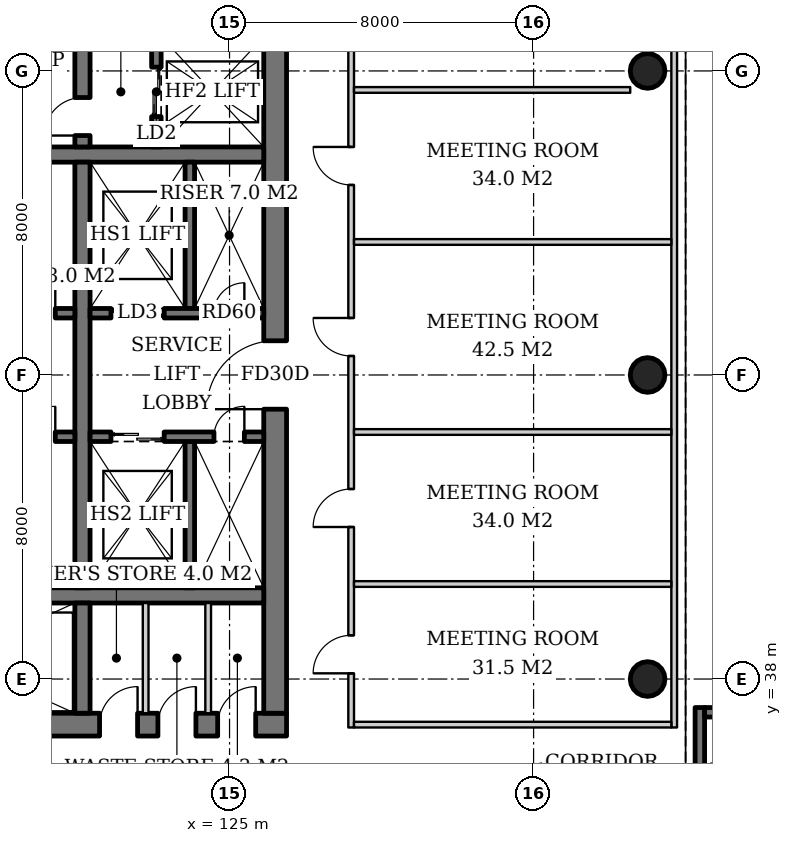
"""IFC4 building model, lengths in metres.
Left out: names, types, materials, properties, quantities, classifications, styles, units other than length and angle.
Written with IfcOpenShell. Run it as: python <this file> out.ifc"""

import sys

from ifc_helpers import new_model, si_unit, direction, frame, frame_2d, origin, origin_2d, place, context, subcontext, project, spatial, rectangle, hollow_circle, extrude, element, fill, save


model = new_model("IFC4")
c1 = context("Model", 3, precision=1e-05, world=origin(), true_north=direction((0.0, 1.0)))
c2 = subcontext(c1, "Body", "Model", "MODEL_VIEW")
j1 = project(units=[si_unit("LENGTHUNIT", "METRE"), si_unit("PLANEANGLEUNIT", "RADIAN")], contexts=[c1])
p1 = place(None, origin())
s1 = spatial("IfcSite", under=j1, at=p1, CompositionType="ELEMENT")
p2 = place(p1, origin())
s2 = spatial("IfcBuilding", under=s1, at=p2, CompositionType="ELEMENT")
p3 = place(p2, frame((0.0, 0.0, 11.0)))
s3 = spatial("IfcBuildingStorey", under=s2, at=p3, CompositionType="ELEMENT", Elevation=11.0)
for number, where, z_axis, x_axis in (
    (1, (136.0, 38.0, 0.0), (0.0, 0.0, 1.0), (1.0, 0.0, 0.0)),
    (2, (136.0, 46.0, 0.0), (0.0, 0.0, 1.0), (1.0, 0.0, 0.0)),
    (3, (136.0, 54.0, 0.0), (0.0, 0.0, 1.0), (1.0, 0.0, 0.0)),
):
    element("IfcColumn", number, at=place(p3, frame(where, z_axis=z_axis, x_axis=x_axis)), inside=s3, PredefinedType="COLUMN", context=c2, shape_type="SweptSolid", body=[
        extrude(hollow_circle(Radius=0.457, WallThickness=0.03, at=origin_2d()), origin(), (0.0, 0.0, 1.0), 5.0),
    ])
p4 = place(p3, frame((107.5, 36.8, 0.0), z_axis=(0.0, 0.0, 1.0), x_axis=(1.0, 0.0, 0.0)))
e4 = element("IfcWall", 4, at=p4, inside=s3, PredefinedType="SHEAR", context=c2, shape_type="SweptSolid", body=[
    extrude(rectangle(XDim=19.0, YDim=0.6, at=frame_2d((9.5, 0.0))), origin(), (0.0, 0.0, 1.0), 5.0),
])
p5 = place(p4, frame((3.9, 0.0, 0.0)))
e5 = element("IfcOpeningElement", 5, at=p5, cuts=e4, PredefinedType="OPENING", context=c2, shape_type="SweptSolid", body=[
    extrude(rectangle(XDim=1.0, YDim=2.1, at=frame_2d((0.5, 1.05))), frame((0.0, 0.31, 0.0), z_axis=(0.0, -1.0, 0.0), x_axis=(1.0, 0.0, 0.0)), (0.0, 0.0, 1.0), 0.62),
])
p6 = place(p4, frame((14.08, 0.0, 0.0)))
e6 = element("IfcOpeningElement", 6, at=p6, cuts=e4, PredefinedType="OPENING", context=c2, shape_type="SweptSolid", body=[
    extrude(rectangle(XDim=1.0, YDim=2.1, at=frame_2d((0.5, 1.05))), frame((0.0, 0.31, 0.0), z_axis=(0.0, -1.0, 0.0), x_axis=(1.0, 0.0, 0.0)), (0.0, 0.0, 1.0), 0.62),
])
p7 = place(p4, frame((15.615, 0.0, 0.0)))
e7 = element("IfcOpeningElement", 7, at=p7, cuts=e4, PredefinedType="OPENING", context=c2, shape_type="SweptSolid", body=[
    extrude(rectangle(XDim=1.0, YDim=2.1, at=frame_2d((0.5, 1.05))), frame((0.0, 0.31, 0.0), z_axis=(0.0, -1.0, 0.0), x_axis=(1.0, 0.0, 0.0)), (0.0, 0.0, 1.0), 0.62),
])
p8 = place(p4, frame((17.188, 0.0, 0.0)))
e8 = element("IfcOpeningElement", 8, at=p8, cuts=e4, PredefinedType="OPENING", context=c2, shape_type="SweptSolid", body=[
    extrude(rectangle(XDim=1.0, YDim=2.1, at=frame_2d((0.5, 1.05))), frame((0.0, 0.31, 0.0), z_axis=(0.0, -1.0, 0.0), x_axis=(1.0, 0.0, 0.0)), (0.0, 0.0, 1.0), 0.62),
])
p9 = place(p3, frame((126.2, 37.1, 0.0), z_axis=(0.0, 0.0, 1.0), x_axis=(0.0, 1.0, 0.0)))
e9 = element("IfcWall", 9, at=p9, inside=s3, PredefinedType="SHEAR", context=c2, shape_type="SweptSolid", body=[
    extrude(rectangle(XDim=17.8, YDim=0.6, at=frame_2d((8.9, 0.0))), origin(), (0.0, 0.0, 1.0), 5.0),
])
p10 = place(p9, frame((8.0, 0.0, 0.0)))
e10 = element("IfcOpeningElement", 10, at=p10, cuts=e9, PredefinedType="OPENING", context=c2, shape_type="SweptSolid", body=[
    extrude(rectangle(XDim=1.8, YDim=2.4, at=frame_2d((0.9, 1.2))), frame((0.0, 0.31, 0.0), z_axis=(0.0, -1.0, 0.0), x_axis=(1.0, 0.0, 0.0)), (0.0, 0.0, 1.0), 0.62),
])
for number, where, z_axis, x_axis in (
    (11, (108.1, 40.2, 0.0), (0.0, 0.0, 1.0), (1.0, 0.0, 0.0)),
    (12, (108.1, 51.8, 0.0), (0.0, 0.0, 1.0), (1.0, 0.0, 0.0)),
):
    element("IfcWall", number, at=place(p3, frame(where, z_axis=z_axis, x_axis=x_axis)), inside=s3, PredefinedType="SHEAR", context=c2, shape_type="SweptSolid", body=[
        extrude(rectangle(XDim=17.8, YDim=0.4, at=frame_2d((8.9, 0.0))), origin(), (0.0, 0.0, 1.0), 5.0),
    ])
p11 = place(p3, frame((121.13, 37.1, 0.0), z_axis=(0.0, 0.0, 1.0), x_axis=(0.0, 1.0, 0.0)))
e13 = element("IfcWall", 13, at=p11, inside=s3, PredefinedType="SHEAR", context=c2, shape_type="SweptSolid", body=[
    extrude(rectangle(XDim=2.9, YDim=0.4, at=frame_2d((1.45, 0.0))), origin(), (0.0, 0.0, 1.0), 5.0),
])
p12 = place(p3, frame((121.13, 40.4, 0.0), z_axis=(0.0, 0.0, 1.0), x_axis=(0.0, 1.0, 0.0)))
e14 = element("IfcWall", 14, at=p12, inside=s3, PredefinedType="SHEAR", context=c2, shape_type="SweptSolid", body=[
    extrude(rectangle(XDim=11.2, YDim=0.4, at=frame_2d((5.6, 0.0))), origin(), (0.0, 0.0, 1.0), 5.0),
])
p13 = place(p3, frame((121.13, 52.0, 0.0), z_axis=(0.0, 0.0, 1.0), x_axis=(0.0, 1.0, 0.0)))
e15 = element("IfcWall", 15, at=p13, inside=s3, PredefinedType="SHEAR", context=c2, shape_type="SweptSolid", body=[
    extrude(rectangle(XDim=2.9, YDim=0.4, at=frame_2d((1.45, 0.0))), origin(), (0.0, 0.0, 1.0), 5.0),
])
p14 = place(p13, frame((0.3, 0.0, 0.0)))
e16 = element("IfcOpeningElement", 16, at=p14, cuts=e15, PredefinedType="OPENING", context=c2, shape_type="SweptSolid", body=[
    extrude(rectangle(XDim=1.0, YDim=2.1, at=frame_2d((0.5, 1.05))), frame((0.0, 0.21, 0.0), z_axis=(0.0, -1.0, 0.0), x_axis=(1.0, 0.0, 0.0)), (0.0, 0.0, 1.0), 0.42),
])
p15 = place(p3, frame((123.075, 52.0, 0.0), z_axis=(0.0, 0.0, 1.0), x_axis=(0.0, 1.0, 0.0)))
e17 = element("IfcWall", 17, at=p15, inside=s3, PredefinedType="SHEAR", context=c2, shape_type="SweptSolid", body=[
    extrude(rectangle(XDim=2.9, YDim=0.25, at=frame_2d((1.45, 0.0))), origin(), (0.0, 0.0, 1.0), 5.0),
])
p16 = place(p15, frame((0.8, 0.0, 0.0)))
e18 = element("IfcOpeningElement", 18, at=p16, cuts=e17, PredefinedType="OPENING", context=c2, shape_type="SweptSolid", body=[
    extrude(rectangle(XDim=1.3, YDim=2.2, at=frame_2d((0.65, 1.1))), frame((0.0, 0.135, 0.0), z_axis=(0.0, -1.0, 0.0), x_axis=(1.0, 0.0, 0.0)), (0.0, 0.0, 1.0), 0.27),
])
p17 = place(p3, frame((108.1, 47.625, 0.0), z_axis=(0.0, 0.0, 1.0), x_axis=(1.0, 0.0, 0.0)))
e19 = element("IfcWall", 19, at=p17, inside=s3, PredefinedType="SHEAR", context=c2, shape_type="SweptSolid", body=[
    extrude(rectangle(XDim=12.83, YDim=0.25, at=frame_2d((6.415, 0.0))), origin(), (0.0, 0.0, 1.0), 5.0),
])
p18 = place(p17, frame((11.515, 0.0, 0.0)))
e20 = element("IfcOpeningElement", 20, at=p18, cuts=e19, PredefinedType="OPENING", context=c2, shape_type="SweptSolid", body=[
    extrude(rectangle(XDim=0.8, YDim=2.0, at=frame_2d((0.4, 1.0))), frame((0.0, 0.135, 0.0), z_axis=(0.0, -1.0, 0.0), x_axis=(1.0, 0.0, 0.0)), (0.0, 0.0, 1.0), 0.27),
])
p19 = place(p3, frame((108.1, 44.375, 0.0), z_axis=(0.0, 0.0, 1.0), x_axis=(1.0, 0.0, 0.0)))
e21 = element("IfcWall", 21, at=p19, inside=s3, PredefinedType="SHEAR", context=c2, shape_type="SweptSolid", body=[
    extrude(rectangle(XDim=12.83, YDim=0.25, at=frame_2d((6.415, 0.0))), origin(), (0.0, 0.0, 1.0), 5.0),
])
p20 = place(p19, frame((9.0, 0.0, 0.0)))
e22 = element("IfcOpeningElement", 22, at=p20, cuts=e21, PredefinedType="OPENING", context=c2, shape_type="SweptSolid", body=[
    extrude(rectangle(XDim=1.0, YDim=2.1, at=frame_2d((0.5, 1.05))), frame((0.0, 0.135, 0.0), z_axis=(0.0, -1.0, 0.0), x_axis=(1.0, 0.0, 0.0)), (0.0, 0.0, 1.0), 0.27),
])
p21 = place(p19, frame((11.515, 0.0, 0.0)))
e23 = element("IfcOpeningElement", 23, at=p21, cuts=e21, PredefinedType="OPENING", context=c2, shape_type="SweptSolid", body=[
    extrude(rectangle(XDim=0.8, YDim=2.0, at=frame_2d((0.4, 1.0))), frame((0.0, 0.135, 0.0), z_axis=(0.0, -1.0, 0.0), x_axis=(1.0, 0.0, 0.0)), (0.0, 0.0, 1.0), 0.27),
])
p22 = place(p3, frame((123.955, 47.75, 0.0), z_axis=(0.0, 0.0, 1.0), x_axis=(0.0, 1.0, 0.0)))
e24 = element("IfcWall", 24, at=p22, inside=s3, PredefinedType="SHEAR", context=c2, shape_type="SweptSolid", body=[
    extrude(rectangle(XDim=3.85, YDim=0.25, at=frame_2d((1.925, 0.0))), origin(), (0.0, 0.0, 1.0), 5.0),
])
p23 = place(p3, frame((121.33, 47.625, 0.0), z_axis=(0.0, 0.0, 1.0), x_axis=(1.0, 0.0, 0.0)))
e25 = element("IfcWall", 25, at=p23, inside=s3, PredefinedType="SHEAR", context=c2, shape_type="SweptSolid", body=[
    extrude(rectangle(XDim=4.57, YDim=0.25, at=frame_2d((2.285, 0.0))), origin(), (0.0, 0.0, 1.0), 5.0),
])
p24 = place(p23, frame((0.55, 0.0, 0.0)))
e26 = element("IfcOpeningElement", 26, at=p24, cuts=e25, PredefinedType="OPENING", context=c2, shape_type="SweptSolid", body=[
    extrude(rectangle(XDim=1.4, YDim=2.4, at=frame_2d((0.7, 1.2))), frame((0.0, 0.135, 0.0), z_axis=(0.0, -1.0, 0.0), x_axis=(1.0, 0.0, 0.0)), (0.0, 0.0, 1.0), 0.27),
])
p25 = place(p23, frame((3.26, 0.0, 0.0)))
e27 = element("IfcOpeningElement", 27, at=p25, cuts=e25, PredefinedType="OPENING", context=c2, shape_type="SweptSolid", body=[
    extrude(rectangle(XDim=0.8, YDim=2.0, at=frame_2d((0.4, 1.0))), frame((0.0, 0.135, 0.0), z_axis=(0.0, -1.0, 0.0), x_axis=(1.0, 0.0, 0.0)), (0.0, 0.0, 1.0), 0.27),
])
p26 = place(p3, frame((123.955, 44.25, 0.0), z_axis=(0.0, 0.0, 1.0), x_axis=(0.0, -1.0, 0.0)))
e28 = element("IfcWall", 28, at=p26, inside=s3, PredefinedType="SHEAR", context=c2, shape_type="SweptSolid", body=[
    extrude(rectangle(XDim=3.85, YDim=0.25, at=frame_2d((1.925, 0.0))), origin(), (0.0, 0.0, 1.0), 5.0),
])
p27 = place(p3, frame((121.33, 44.375, 0.0), z_axis=(0.0, 0.0, 1.0), x_axis=(1.0, 0.0, 0.0)))
e29 = element("IfcWall", 29, at=p27, inside=s3, PredefinedType="SHEAR", context=c2, shape_type="SweptSolid", body=[
    extrude(rectangle(XDim=4.57, YDim=0.25, at=frame_2d((2.285, 0.0))), origin(), (0.0, 0.0, 1.0), 5.0),
])
p28 = place(p27, frame((0.55, 0.0, 0.0)))
e30 = element("IfcOpeningElement", 30, at=p28, cuts=e29, PredefinedType="OPENING", context=c2, shape_type="SweptSolid", body=[
    extrude(rectangle(XDim=1.4, YDim=2.4, at=frame_2d((0.7, 1.2))), frame((0.0, 0.135, 0.0), z_axis=(0.0, -1.0, 0.0), x_axis=(1.0, 0.0, 0.0)), (0.0, 0.0, 1.0), 0.27),
])
p29 = place(p27, frame((3.26, 0.0, 0.0)))
e31 = element("IfcOpeningElement", 31, at=p29, cuts=e29, PredefinedType="OPENING", context=c2, shape_type="SweptSolid", body=[
    extrude(rectangle(XDim=0.8, YDim=2.0, at=frame_2d((0.4, 1.0))), frame((0.0, 0.135, 0.0), z_axis=(0.0, -1.0, 0.0), x_axis=(1.0, 0.0, 0.0)), (0.0, 0.0, 1.0), 0.27),
])
for number, where, z_axis, x_axis in (
    (32, (122.792, 37.1, 0.0), (0.0, 0.0, 1.0), (0.0, 1.0, 0.0)),
    (33, (124.438, 37.1, 0.0), (0.0, 0.0, 1.0), (0.0, 1.0, 0.0)),
):
    element("IfcWall", number, at=place(p3, frame(where, z_axis=z_axis, x_axis=x_axis)), inside=s3, PredefinedType="SOLIDWALL", context=c2, shape_type="SweptSolid", body=[
        extrude(rectangle(XDim=2.9, YDim=0.15, at=frame_2d((1.45, 0.0))), origin(), (0.0, 0.0, 1.0), 4.7),
    ])
p30 = place(p3, frame((137.375, 28.75, 0.0), z_axis=(0.0, 0.0, 1.0), x_axis=(0.0, 1.0, 0.0)))
e34 = element("IfcWall", 34, at=p30, inside=s3, PredefinedType="SOLIDWALL", context=c2, shape_type="SweptSolid", body=[
    extrude(rectangle(XDim=8.5, YDim=0.25, at=frame_2d((4.25, 0.0))), origin(), (0.0, 0.0, 1.0), 4.7),
])
p31 = place(p3, frame((137.5, 37.125, 0.0), z_axis=(0.0, 0.0, 1.0), x_axis=(1.0, 0.0, 0.0)))
e35 = element("IfcWall", 35, at=p31, inside=s3, PredefinedType="SOLIDWALL", context=c2, shape_type="SweptSolid", body=[
    extrude(rectangle(XDim=3.0, YDim=0.25, at=frame_2d((1.5, 0.0))), origin(), (0.0, 0.0, 1.0), 4.7),
])
p32 = place(p31, frame((0.9, 0.0, 0.0)))
e36 = element("IfcOpeningElement", 36, at=p32, cuts=e35, PredefinedType="OPENING", context=c2, shape_type="SweptSolid", body=[
    extrude(rectangle(XDim=1.2, YDim=2.1, at=frame_2d((0.6, 1.05))), frame((0.0, 0.135, 0.0), z_axis=(0.0, -1.0, 0.0), x_axis=(1.0, 0.0, 0.0)), (0.0, 0.0, 1.0), 0.27),
])
p33 = place(p3, frame((128.2, 36.725, 0.0), z_axis=(0.0, 0.0, 1.0), x_axis=(0.0, 1.0, 0.0)))
e37 = element("IfcWall", 37, at=p33, inside=s3, PredefinedType="PARTITIONING", context=c2, shape_type="SweptSolid", body=[
    extrude(rectangle(XDim=20.475, YDim=0.15, at=frame_2d((10.237, 0.0))), origin(), (0.0, 0.0, 1.0), 3.9),
])
p34 = place(p33, frame((1.425, 0.0, 0.0)))
e38 = element("IfcOpeningElement", 38, at=p34, cuts=e37, PredefinedType="OPENING", context=c2, shape_type="SweptSolid", body=[
    extrude(rectangle(XDim=1.0, YDim=2.1, at=frame_2d((0.5, 1.05))), frame((0.0, 0.085, 0.0), z_axis=(0.0, -1.0, 0.0), x_axis=(1.0, 0.0, 0.0)), (0.0, 0.0, 1.0), 0.17),
])
p35 = place(p33, frame((5.275, 0.0, 0.0)))
e39 = element("IfcOpeningElement", 39, at=p35, cuts=e37, PredefinedType="OPENING", context=c2, shape_type="SweptSolid", body=[
    extrude(rectangle(XDim=1.0, YDim=2.1, at=frame_2d((0.5, 1.05))), frame((0.0, 0.085, 0.0), z_axis=(0.0, -1.0, 0.0), x_axis=(1.0, 0.0, 0.0)), (0.0, 0.0, 1.0), 0.17),
])
p36 = place(p33, frame((9.775, 0.0, 0.0)))
e40 = element("IfcOpeningElement", 40, at=p36, cuts=e37, PredefinedType="OPENING", context=c2, shape_type="SweptSolid", body=[
    extrude(rectangle(XDim=1.0, YDim=2.1, at=frame_2d((0.5, 1.05))), frame((0.0, 0.085, 0.0), z_axis=(0.0, -1.0, 0.0), x_axis=(1.0, 0.0, 0.0)), (0.0, 0.0, 1.0), 0.17),
])
p37 = place(p33, frame((14.275, 0.0, 0.0)))
e41 = element("IfcOpeningElement", 41, at=p37, cuts=e37, PredefinedType="OPENING", context=c2, shape_type="SweptSolid", body=[
    extrude(rectangle(XDim=1.0, YDim=2.1, at=frame_2d((0.5, 1.05))), frame((0.0, 0.085, 0.0), z_axis=(0.0, -1.0, 0.0), x_axis=(1.0, 0.0, 0.0)), (0.0, 0.0, 1.0), 0.17),
])
p38 = place(p33, frame((18.125, 0.0, 0.0)))
e42 = element("IfcOpeningElement", 42, at=p38, cuts=e37, PredefinedType="OPENING", context=c2, shape_type="SweptSolid", body=[
    extrude(rectangle(XDim=1.0, YDim=2.1, at=frame_2d((0.5, 1.05))), frame((0.0, 0.085, 0.0), z_axis=(0.0, -1.0, 0.0), x_axis=(1.0, 0.0, 0.0)), (0.0, 0.0, 1.0), 0.17),
])
p39 = place(p3, frame((136.7, 36.725, 0.0), z_axis=(0.0, 0.0, 1.0), x_axis=(0.0, 1.0, 0.0)))
e43 = element("IfcWall", 43, at=p39, inside=s3, PredefinedType="PARTITIONING", context=c2, shape_type="SweptSolid", body=[
    extrude(rectangle(XDim=20.475, YDim=0.15, at=frame_2d((10.237, 0.0))), origin(), (0.0, 0.0, 1.0), 4.7),
])
p40 = place(p3, frame((128.275, 36.8, 0.0), z_axis=(0.0, 0.0, 1.0), x_axis=(1.0, 0.0, 0.0)))
e44 = element("IfcWall", 44, at=p40, inside=s3, PredefinedType="PARTITIONING", context=c2, shape_type="SweptSolid", body=[
    extrude(rectangle(XDim=8.35, YDim=0.15, at=frame_2d((4.175, 0.0))), origin(), (0.0, 0.0, 1.0), 3.9),
])
for number, where, z_axis, x_axis in (
    (45, (128.275, 40.5, 0.0), (0.0, 0.0, 1.0), (1.0, 0.0, 0.0)),
    (46, (128.275, 44.5, 0.0), (0.0, 0.0, 1.0), (1.0, 0.0, 0.0)),
    (47, (128.275, 49.5, 0.0), (0.0, 0.0, 1.0), (1.0, 0.0, 0.0)),
):
    element("IfcWall", number, at=place(p3, frame(where, z_axis=z_axis, x_axis=x_axis)), inside=s3, PredefinedType="PARTITIONING", context=c2, shape_type="SweptSolid", body=[
        extrude(rectangle(XDim=8.35, YDim=0.15, at=frame_2d((4.175, 0.0))), origin(), (0.0, 0.0, 1.0), 4.15),
    ])
p41 = place(p3, frame((128.275, 53.5, 0.0), z_axis=(0.0, 0.0, 1.0), x_axis=(1.0, 0.0, 0.0)))
e48 = element("IfcWall", 48, at=p41, inside=s3, PredefinedType="PARTITIONING", context=c2, shape_type="SweptSolid", body=[
    extrude(rectangle(XDim=7.268, YDim=0.15, at=frame_2d((3.634, 0.0))), origin(), (0.0, 0.0, 1.0), 4.7),
])
p42 = place(p16, origin())
e49 = element("IfcDoor", 49, at=p42, inside=s3, OperationType="DOUBLE_DOOR_SLIDING", PredefinedType="DOOR", context=c2, shape_type="SweptSolid", body=[
    extrude(rectangle(XDim=1.3, YDim=2.2, at=frame_2d((0.65, 1.1))), frame((0.0, 0.025, 0.0), z_axis=(0.0, -1.0, 0.0), x_axis=(1.0, 0.0, 0.0)), (0.0, 0.0, 1.0), 0.05),
])
fill(e18, e49)
p43 = place(p18, origin())
e50 = element("IfcDoor", 50, at=p43, inside=s3, OperationType="SINGLE_SWING_RIGHT", PredefinedType="DOOR", context=c2, shape_type="SweptSolid", body=[
    extrude(rectangle(XDim=0.8, YDim=2.0, at=frame_2d((0.4, 1.0))), frame((0.0, 0.025, 0.0), z_axis=(0.0, -1.0, 0.0), x_axis=(1.0, 0.0, 0.0)), (0.0, 0.0, 1.0), 0.05),
])
fill(e20, e50)
p44 = place(p21, origin())
e51 = element("IfcDoor", 51, at=p44, inside=s3, OperationType="SINGLE_SWING_RIGHT", PredefinedType="DOOR", context=c2, shape_type="SweptSolid", body=[
    extrude(rectangle(XDim=0.8, YDim=2.0, at=frame_2d((0.4, 1.0))), frame((0.0, 0.025, 0.0), z_axis=(0.0, -1.0, 0.0), x_axis=(1.0, 0.0, 0.0)), (0.0, 0.0, 1.0), 0.05),
])
fill(e23, e51)
p45 = place(p24, origin())
e52 = element("IfcDoor", 52, at=p45, inside=s3, OperationType="DOUBLE_DOOR_SLIDING", PredefinedType="DOOR", context=c2, shape_type="SweptSolid", body=[
    extrude(rectangle(XDim=1.4, YDim=2.4, at=frame_2d((0.7, 1.2))), frame((0.0, 0.025, 0.0), z_axis=(0.0, -1.0, 0.0), x_axis=(1.0, 0.0, 0.0)), (0.0, 0.0, 1.0), 0.05),
])
fill(e26, e52)
p46 = place(p25, origin())
e53 = element("IfcDoor", 53, at=p46, inside=s3, OperationType="SINGLE_SWING_RIGHT", PredefinedType="DOOR", context=c2, shape_type="SweptSolid", body=[
    extrude(rectangle(XDim=0.8, YDim=2.0, at=frame_2d((0.4, 1.0))), frame((0.0, 0.025, 0.0), z_axis=(0.0, -1.0, 0.0), x_axis=(1.0, 0.0, 0.0)), (0.0, 0.0, 1.0), 0.05),
])
fill(e27, e53)
p47 = place(p28, origin())
e54 = element("IfcDoor", 54, at=p47, inside=s3, OperationType="DOUBLE_DOOR_SLIDING", PredefinedType="DOOR", context=c2, shape_type="SweptSolid", body=[
    extrude(rectangle(XDim=1.4, YDim=2.4, at=frame_2d((0.7, 1.2))), frame((0.0, 0.025, 0.0), z_axis=(0.0, -1.0, 0.0), x_axis=(1.0, 0.0, 0.0)), (0.0, 0.0, 1.0), 0.05),
])
fill(e30, e54)
p48 = place(p29, origin())
e55 = element("IfcDoor", 55, at=p48, inside=s3, OperationType="SINGLE_SWING_RIGHT", PredefinedType="DOOR", context=c2, shape_type="SweptSolid", body=[
    extrude(rectangle(XDim=0.8, YDim=2.0, at=frame_2d((0.4, 1.0))), frame((0.0, 0.025, 0.0), z_axis=(0.0, -1.0, 0.0), x_axis=(1.0, 0.0, 0.0)), (0.0, 0.0, 1.0), 0.05),
])
fill(e31, e55)
p49 = place(p14, origin())
e56 = element("IfcDoor", 56, at=p49, inside=s3, OperationType="SINGLE_SWING_LEFT", PredefinedType="DOOR", context=c2, shape_type="SweptSolid", body=[
    extrude(rectangle(XDim=1.0, YDim=2.1, at=frame_2d((0.5, 1.05))), frame((0.0, 0.025, 0.0), z_axis=(0.0, -1.0, 0.0), x_axis=(1.0, 0.0, 0.0)), (0.0, 0.0, 1.0), 0.05),
])
fill(e16, e56)
p50 = place(p10, origin())
e57 = element("IfcDoor", 57, at=p50, inside=s3, OperationType="DOUBLE_DOOR_SINGLE_SWING", PredefinedType="DOOR", context=c2, shape_type="SweptSolid", body=[
    extrude(rectangle(XDim=1.8, YDim=2.4, at=frame_2d((0.9, 1.2))), frame((0.0, 0.025, 0.0), z_axis=(0.0, -1.0, 0.0), x_axis=(1.0, 0.0, 0.0)), (0.0, 0.0, 1.0), 0.05),
])
fill(e10, e57)
p51 = place(p6, origin())
e58 = element("IfcDoor", 58, at=p51, inside=s3, OperationType="SINGLE_SWING_RIGHT", PredefinedType="DOOR", context=c2, shape_type="SweptSolid", body=[
    extrude(rectangle(XDim=1.0, YDim=2.1, at=frame_2d((0.5, 1.05))), frame((0.0, 0.29, 0.0), z_axis=(0.0, -1.0, 0.0), x_axis=(1.0, 0.0, 0.0)), (0.0, 0.0, 1.0), 0.05),
])
fill(e6, e58)
p52 = place(p7, origin())
e59 = element("IfcDoor", 59, at=p52, inside=s3, OperationType="SINGLE_SWING_RIGHT", PredefinedType="DOOR", context=c2, shape_type="SweptSolid", body=[
    extrude(rectangle(XDim=1.0, YDim=2.1, at=frame_2d((0.5, 1.05))), frame((0.0, 0.29, 0.0), z_axis=(0.0, -1.0, 0.0), x_axis=(1.0, 0.0, 0.0)), (0.0, 0.0, 1.0), 0.05),
])
fill(e7, e59)
p53 = place(p8, origin())
e60 = element("IfcDoor", 60, at=p53, inside=s3, OperationType="SINGLE_SWING_RIGHT", PredefinedType="DOOR", context=c2, shape_type="SweptSolid", body=[
    extrude(rectangle(XDim=1.0, YDim=2.1, at=frame_2d((0.5, 1.05))), frame((0.0, 0.29, 0.0), z_axis=(0.0, -1.0, 0.0), x_axis=(1.0, 0.0, 0.0)), (0.0, 0.0, 1.0), 0.05),
])
fill(e8, e60)
p54 = place(p34, origin())
e61 = element("IfcDoor", 61, at=p54, inside=s3, OperationType="SINGLE_SWING_LEFT", PredefinedType="DOOR", context=c2, shape_type="SweptSolid", body=[
    extrude(rectangle(XDim=1.0, YDim=2.1, at=frame_2d((0.5, 1.05))), frame((0.0, 0.025, 0.0), z_axis=(0.0, -1.0, 0.0), x_axis=(1.0, 0.0, 0.0)), (0.0, 0.0, 1.0), 0.05),
])
fill(e38, e61)
p55 = place(p35, origin())
e62 = element("IfcDoor", 62, at=p55, inside=s3, OperationType="SINGLE_SWING_LEFT", PredefinedType="DOOR", context=c2, shape_type="SweptSolid", body=[
    extrude(rectangle(XDim=1.0, YDim=2.1, at=frame_2d((0.5, 1.05))), frame((0.0, 0.025, 0.0), z_axis=(0.0, -1.0, 0.0), x_axis=(1.0, 0.0, 0.0)), (0.0, 0.0, 1.0), 0.05),
])
fill(e39, e62)
p56 = place(p36, origin())
e63 = element("IfcDoor", 63, at=p56, inside=s3, OperationType="SINGLE_SWING_RIGHT", PredefinedType="DOOR", context=c2, shape_type="SweptSolid", body=[
    extrude(rectangle(XDim=1.0, YDim=2.1, at=frame_2d((0.5, 1.05))), frame((0.0, 0.025, 0.0), z_axis=(0.0, -1.0, 0.0), x_axis=(1.0, 0.0, 0.0)), (0.0, 0.0, 1.0), 0.05),
])
fill(e40, e63)
p57 = place(p37, origin())
e64 = element("IfcDoor", 64, at=p57, inside=s3, OperationType="SINGLE_SWING_RIGHT", PredefinedType="DOOR", context=c2, shape_type="SweptSolid", body=[
    extrude(rectangle(XDim=1.0, YDim=2.1, at=frame_2d((0.5, 1.05))), frame((0.0, 0.025, 0.0), z_axis=(0.0, -1.0, 0.0), x_axis=(1.0, 0.0, 0.0)), (0.0, 0.0, 1.0), 0.05),
])
fill(e41, e64)
save(model, sys.argv[1])
